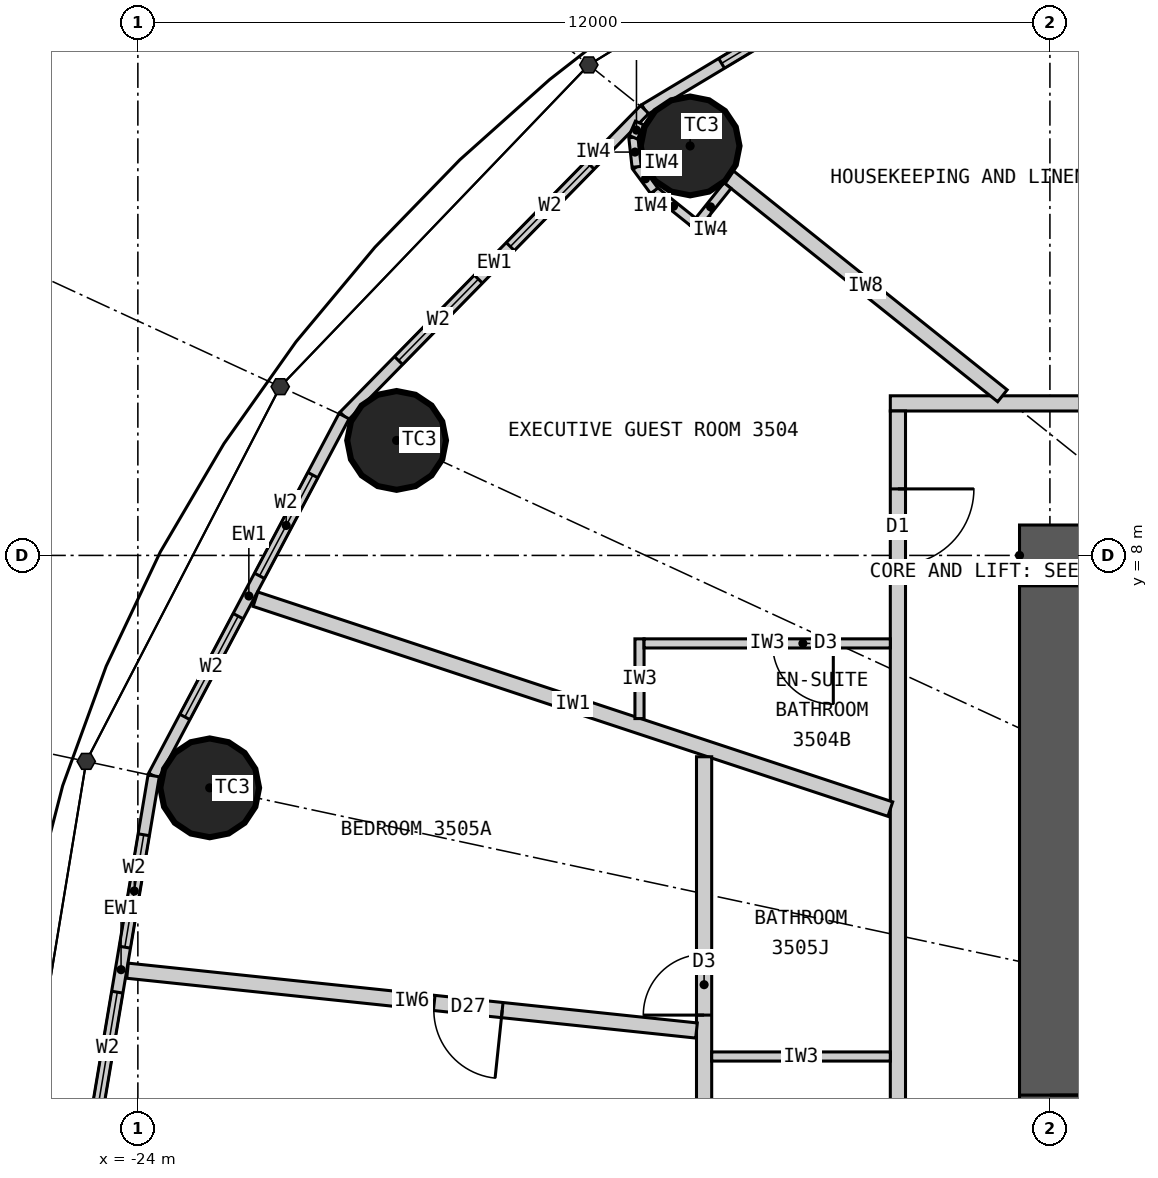
"""IFC4 building model, lengths in metres.
Left out: names, types, materials, properties, quantities, classifications, styles, units other than length and angle.
Written with IfcOpenShell. Run it as: python <this file> out.ifc"""

import sys

from ifc_helpers import new_model, si_unit, direction, frame, frame_2d, origin, origin_2d, place, context, subcontext, project, spatial, rectangle, circle, extrude, clip, halfspace, element, fill, save


model = new_model("IFC4")
c1 = context("Model", 3, precision=1e-05, world=origin(), true_north=direction((0.0, 1.0)))
c2 = subcontext(c1, "Body", "Model", "MODEL_VIEW")
j1 = project(units=[si_unit("LENGTHUNIT", "METRE"), si_unit("PLANEANGLEUNIT", "RADIAN")], contexts=[c1])
p1 = place(None, origin())
s1 = spatial("IfcSite", under=j1, at=p1, CompositionType="ELEMENT")
p2 = place(p1, origin())
s2 = spatial("IfcBuilding", under=s1, at=p2, CompositionType="ELEMENT")
p3 = place(p2, frame((0.0, 0.0, 135.3)))
s3 = spatial("IfcBuildingStorey", under=s2, at=p3, CompositionType="ELEMENT", Elevation=135.3)
for number, where, z_axis, x_axis in (
    (1, (-16.734, 13.387, 0.0), (0.0, 0.0, 1.0), (1.0, 0.0, 0.0)),
    (2, (-20.596, 9.513, 0.0), (0.0, 0.0, 1.0), (1.0, 0.0, 0.0)),
    (3, (-23.055, 4.942, 0.0), (0.0, 0.0, 1.0), (1.0, 0.0, 0.0)),
):
    element("IfcColumn", number, at=place(p3, frame(where, z_axis=z_axis, x_axis=x_axis)), inside=s3, PredefinedType="COLUMN", context=c2, shape_type="Clipping", body=[
        clip(extrude(circle(Radius=0.65, at=origin_2d()), origin(), (0.0, 0.0, 1.0), 3.3), halfspace(frame((0.0, 0.0, 2.25), z_axis=(0.0, 0.0, 1.0), x_axis=(1.0, 0.0, 0.0)), False)),
    ])
p4 = place(p3, frame((-12.4, 8.0, 0.0), z_axis=(0.0, 0.0, 1.0), x_axis=(1.0, 0.0, 0.0)))
e4 = element("IfcWall", 4, at=p4, inside=s3, PredefinedType="SHEAR", context=c2, shape_type="SweptSolid", body=[
    extrude(rectangle(XDim=24.8, YDim=0.8, at=frame_2d((12.4, 0.0))), origin(), (0.0, 0.0, 1.0), 3.3),
])
p5 = place(p4, frame((11.1, 0.0, 0.0)))
e5 = element("IfcOpeningElement", 5, at=p5, cuts=e4, PredefinedType="OPENING", context=c2, shape_type="SweptSolid", body=[
    extrude(rectangle(XDim=1.2, YDim=2.2, at=frame_2d((0.6, 1.1))), frame((0.0, 0.41, 0.0), z_axis=(0.0, -1.0, 0.0), x_axis=(1.0, 0.0, 0.0)), (0.0, 0.0, 1.0), 0.82),
])
p6 = place(p4, frame((18.7, 0.0, 0.0)))
e6 = element("IfcOpeningElement", 6, at=p6, cuts=e4, PredefinedType="OPENING", context=c2, shape_type="SweptSolid", body=[
    extrude(rectangle(XDim=0.9, YDim=2.2, at=frame_2d((0.45, 1.1))), frame((0.0, 0.41, 0.0), z_axis=(0.0, -1.0, 0.0), x_axis=(1.0, 0.0, 0.0)), (0.0, 0.0, 1.0), 0.82),
])
p7 = place(p3, frame((-12.0, 7.6, 0.0), z_axis=(0.0, 0.0, 1.0), x_axis=(0.0, -1.0, 0.0)))
e7 = element("IfcWall", 7, at=p7, inside=s3, PredefinedType="SHEAR", context=c2, shape_type="SweptSolid", body=[
    extrude(rectangle(XDim=15.2, YDim=0.8, at=frame_2d((7.6, 0.0))), origin(), (0.0, 0.0, 1.0), 3.3),
])
p8 = place(p7, frame((6.7, 0.0, 0.0)))
e8 = element("IfcOpeningElement", 8, at=p8, cuts=e7, PredefinedType="OPENING", context=c2, shape_type="SweptSolid", body=[
    extrude(rectangle(XDim=1.8, YDim=2.2, at=frame_2d((0.9, 1.1))), frame((0.0, 0.41, 0.0), z_axis=(0.0, -1.0, 0.0), x_axis=(1.0, 0.0, 0.0)), (0.0, 0.0, 1.0), 0.82),
])
p9 = place(p3, frame((-12.221, 16.935, 0.0), z_axis=(0.0, 0.0, 1.0), x_axis=(-0.857308573723, -0.514802884044, 0.0)))
e9 = element("IfcWall", 9, at=p9, inside=s3, PredefinedType="ELEMENTEDWALL", context=c2, shape_type="SweptSolid", body=[
    extrude(rectangle(XDim=5.961, YDim=0.15, at=frame_2d((2.98, 0.0))), origin(), (0.0, 0.0, 1.0), 3.05),
])
p10 = place(p9, frame((1.181, 0.0, 0.9)))
e10 = element("IfcOpeningElement", 10, at=p10, cuts=e9, PredefinedType="OPENING", context=c2, shape_type="SweptSolid", body=[
    extrude(rectangle(XDim=1.5, YDim=1.9, at=frame_2d((0.75, 0.95))), frame((0.0, 0.085, 0.0), z_axis=(0.0, -1.0, 0.0), x_axis=(1.0, 0.0, 0.0)), (0.0, 0.0, 1.0), 0.17),
])
p11 = place(p9, frame((3.281, 0.0, 0.9)))
e11 = element("IfcOpeningElement", 11, at=p11, cuts=e9, PredefinedType="OPENING", context=c2, shape_type="SweptSolid", body=[
    extrude(rectangle(XDim=1.5, YDim=1.9, at=frame_2d((0.75, 0.95))), frame((0.0, 0.085, 0.0), z_axis=(0.0, -1.0, 0.0), x_axis=(1.0, 0.0, 0.0)), (0.0, 0.0, 1.0), 0.17),
])
p12 = place(p3, frame((-17.332, 13.866, 0.0), z_axis=(0.0, 0.0, 1.0), x_axis=(-0.700136650834, -0.714008872605, 0.0)))
e12 = element("IfcWall", 12, at=p12, inside=s3, PredefinedType="ELEMENTEDWALL", context=c2, shape_type="SweptSolid", body=[
    extrude(rectangle(XDim=5.649, YDim=0.15, at=frame_2d((2.825, 0.0))), origin(), (0.0, 0.0, 1.0), 3.05),
])
p13 = place(p12, frame((1.025, 0.0, 0.9)))
e13 = element("IfcOpeningElement", 13, at=p13, cuts=e12, PredefinedType="OPENING", context=c2, shape_type="SweptSolid", body=[
    extrude(rectangle(XDim=1.5, YDim=1.9, at=frame_2d((0.75, 0.95))), frame((0.0, 0.085, 0.0), z_axis=(0.0, -1.0, 0.0), x_axis=(1.0, 0.0, 0.0)), (0.0, 0.0, 1.0), 0.17),
])
p14 = place(p12, frame((3.125, 0.0, 0.9)))
e14 = element("IfcOpeningElement", 14, at=p14, cuts=e12, PredefinedType="OPENING", context=c2, shape_type="SweptSolid", body=[
    extrude(rectangle(XDim=1.5, YDim=1.9, at=frame_2d((0.75, 0.95))), frame((0.0, 0.085, 0.0), z_axis=(0.0, -1.0, 0.0), x_axis=(1.0, 0.0, 0.0)), (0.0, 0.0, 1.0), 0.17),
])
p15 = place(p3, frame((-21.287, 9.832, 0.0), z_axis=(0.0, 0.0, 1.0), x_axis=(-0.467814388454, -0.883826735257, 0.0)))
e15 = element("IfcWall", 15, at=p15, inside=s3, PredefinedType="ELEMENTEDWALL", context=c2, shape_type="SweptSolid", body=[
    extrude(rectangle(XDim=5.354, YDim=0.15, at=frame_2d((2.677, 0.0))), origin(), (0.0, 0.0, 1.0), 3.05),
])
p16 = place(p15, frame((0.877, 0.0, 0.9)))
e16 = element("IfcOpeningElement", 16, at=p16, cuts=e15, PredefinedType="OPENING", context=c2, shape_type="SweptSolid", body=[
    extrude(rectangle(XDim=1.5, YDim=1.9, at=frame_2d((0.75, 0.95))), frame((0.0, 0.085, 0.0), z_axis=(0.0, -1.0, 0.0), x_axis=(1.0, 0.0, 0.0)), (0.0, 0.0, 1.0), 0.17),
])
p17 = place(p15, frame((2.977, 0.0, 0.9)))
e17 = element("IfcOpeningElement", 17, at=p17, cuts=e15, PredefinedType="OPENING", context=c2, shape_type="SweptSolid", body=[
    extrude(rectangle(XDim=1.5, YDim=1.9, at=frame_2d((0.75, 0.95))), frame((0.0, 0.085, 0.0), z_axis=(0.0, -1.0, 0.0), x_axis=(1.0, 0.0, 0.0)), (0.0, 0.0, 1.0), 0.17),
])
p18 = place(p3, frame((-23.792, 5.1, 0.0), z_axis=(0.0, 0.0, 1.0), x_axis=(-0.165883894218, -0.986145290329, 0.0)))
e18 = element("IfcWall", 18, at=p18, inside=s3, PredefinedType="ELEMENTEDWALL", context=c2, shape_type="SweptSolid", body=[
    extrude(rectangle(XDim=5.172, YDim=0.15, at=frame_2d((2.586, 0.0))), origin(), (0.0, 0.0, 1.0), 3.05),
])
p19 = place(p18, frame((0.786, 0.0, 0.9)))
e19 = element("IfcOpeningElement", 19, at=p19, cuts=e18, PredefinedType="OPENING", context=c2, shape_type="SweptSolid", body=[
    extrude(rectangle(XDim=1.5, YDim=1.9, at=frame_2d((0.75, 0.95))), frame((0.0, 0.085, 0.0), z_axis=(0.0, -1.0, 0.0), x_axis=(1.0, 0.0, 0.0)), (0.0, 0.0, 1.0), 0.17),
])
p20 = place(p18, frame((2.886, 0.0, 0.9)))
e20 = element("IfcOpeningElement", 20, at=p20, cuts=e18, PredefinedType="OPENING", context=c2, shape_type="SweptSolid", body=[
    extrude(rectangle(XDim=1.5, YDim=1.9, at=frame_2d((0.75, 0.95))), frame((0.0, 0.085, 0.0), z_axis=(0.0, -1.0, 0.0), x_axis=(1.0, 0.0, 0.0)), (0.0, 0.0, 1.0), 0.17),
])
p21 = place(p3, frame((-14.1, 10.0, 0.0), z_axis=(0.0, 0.0, 1.0), x_axis=(1.0, 0.0, 0.0)))
e21 = element("IfcWall", 21, at=p21, inside=s3, PredefinedType="PARTITIONING", context=c2, shape_type="SweptSolid", body=[
    extrude(rectangle(XDim=28.2, YDim=0.2, at=frame_2d((14.1, 0.0))), origin(), (0.0, 0.0, 1.0), 3.05),
])
p22 = place(p21, frame((12.884, 0.0, 0.0)))
e22 = element("IfcOpeningElement", 22, at=p22, cuts=e21, PredefinedType="OPENING", context=c2, shape_type="SweptSolid", body=[
    extrude(rectangle(XDim=1.0, YDim=2.2, at=frame_2d((0.5, 1.1))), frame((0.0, 0.11, 0.0), z_axis=(0.0, -1.0, 0.0), x_axis=(1.0, 0.0, 0.0)), (0.0, 0.0, 1.0), 0.22),
])
p23 = place(p21, frame((8.164, 0.0, 0.0)))
e23 = element("IfcOpeningElement", 23, at=p23, cuts=e21, PredefinedType="OPENING", context=c2, shape_type="SweptSolid", body=[
    extrude(rectangle(XDim=1.0, YDim=2.1, at=frame_2d((0.5, 1.05))), frame((0.0, 0.11, 0.0), z_axis=(0.0, -1.0, 0.0), x_axis=(1.0, 0.0, 0.0)), (0.0, 0.0, 1.0), 0.22),
])
p24 = place(p21, frame((3.591, 0.0, 0.0)))
e24 = element("IfcOpeningElement", 24, at=p24, cuts=e21, PredefinedType="OPENING", context=c2, shape_type="SweptSolid", body=[
    extrude(rectangle(XDim=1.0, YDim=2.2, at=frame_2d((0.5, 1.1))), frame((0.0, 0.11, 0.0), z_axis=(0.0, -1.0, 0.0), x_axis=(1.0, 0.0, 0.0)), (0.0, 0.0, 1.0), 0.22),
])
p25 = place(p21, frame((17.12, 0.0, 0.0)))
e25 = element("IfcOpeningElement", 25, at=p25, cuts=e21, PredefinedType="OPENING", context=c2, shape_type="SweptSolid", body=[
    extrude(rectangle(XDim=1.0, YDim=2.1, at=frame_2d((0.5, 1.05))), frame((0.0, 0.11, 0.0), z_axis=(0.0, -1.0, 0.0), x_axis=(1.0, 0.0, 0.0)), (0.0, 0.0, 1.0), 0.22),
])
p26 = place(p3, frame((-14.0, 9.9, 0.0), z_axis=(0.0, 0.0, 1.0), x_axis=(0.0, -1.0, 0.0)))
e26 = element("IfcWall", 26, at=p26, inside=s3, PredefinedType="PARTITIONING", context=c2, shape_type="SweptSolid", body=[
    extrude(rectangle(XDim=19.8, YDim=0.2, at=frame_2d((9.9, 0.0))), origin(), (0.0, 0.0, 1.0), 3.05),
])
p27 = place(p26, frame((1.025, 0.0, 0.0)))
e27 = element("IfcOpeningElement", 27, at=p27, cuts=e26, PredefinedType="OPENING", context=c2, shape_type="SweptSolid", body=[
    extrude(rectangle(XDim=1.0, YDim=2.2, at=frame_2d((0.5, 1.1))), frame((0.0, 0.11, 0.0), z_axis=(0.0, -1.0, 0.0), x_axis=(1.0, 0.0, 0.0)), (0.0, 0.0, 1.0), 0.22),
])
p28 = place(p26, frame((10.831, 0.0, 0.0)))
e28 = element("IfcOpeningElement", 28, at=p28, cuts=e26, PredefinedType="OPENING", context=c2, shape_type="SweptSolid", body=[
    extrude(rectangle(XDim=1.0, YDim=2.2, at=frame_2d((0.5, 1.1))), frame((0.0, 0.11, 0.0), z_axis=(0.0, -1.0, 0.0), x_axis=(1.0, 0.0, 0.0)), (0.0, 0.0, 1.0), 0.22),
])
p29 = place(p3, frame((-12.625, 10.1, 0.0), z_axis=(0.0, 0.0, 1.0), x_axis=(-0.780863644897, 0.624701503182, 0.0)))
e29 = element("IfcWall", 29, at=p29, inside=s3, PredefinedType="PARTITIONING", context=c2, shape_type="SweptSolid", body=[
    extrude(rectangle(XDim=4.612, YDim=0.2, at=frame_2d((2.306, 0.0))), origin(), (0.0, 0.0, 1.0), 2.15),
])
p30 = place(p3, frame((-14.1, 4.662, 0.0), z_axis=(0.0, 0.0, 1.0), x_axis=(-0.949446466373, 0.313928984789, 0.0)))
e30 = element("IfcWall", 30, at=p30, inside=s3, PredefinedType="PARTITIONING", context=c2, shape_type="SweptSolid", body=[
    extrude(rectangle(XDim=8.797, YDim=0.2, at=frame_2d((4.399, 0.0))), origin(), (0.0, 0.0, 1.0), 3.05),
])
p31 = place(p3, frame((-17.4, 5.854, 0.0), z_axis=(0.0, 0.0, 1.0), x_axis=(0.0, 1.0, 0.0)))
e31 = element("IfcWall", 31, at=p31, inside=s3, PredefinedType="PARTITIONING", context=c2, shape_type="SweptSolid", body=[
    extrude(rectangle(XDim=1.049, YDim=0.12, at=frame_2d((0.524, 0.0))), origin(), (0.0, 0.0, 1.0), 3.05),
])
p32 = place(p3, frame((-14.1, 6.842, 0.0), z_axis=(0.0, 0.0, 1.0), x_axis=(-1.0, 0.0, 0.0)))
e32 = element("IfcWall", 32, at=p32, inside=s3, PredefinedType="PARTITIONING", context=c2, shape_type="SweptSolid", body=[
    extrude(rectangle(XDim=3.24, YDim=0.12, at=frame_2d((1.62, 0.0))), origin(), (0.0, 0.0, 1.0), 3.05),
])
p33 = place(p32, frame((0.75, 0.0, 0.0)))
e33 = element("IfcOpeningElement", 33, at=p33, cuts=e32, PredefinedType="OPENING", context=c2, shape_type="SweptSolid", body=[
    extrude(rectangle(XDim=0.8, YDim=2.1, at=frame_2d((0.4, 1.05))), frame((0.0, 0.07, 0.0), z_axis=(0.0, -1.0, 0.0), x_axis=(1.0, 0.0, 0.0)), (0.0, 0.0, 1.0), 0.14),
])
p34 = place(p3, frame((-16.55, 5.351, 0.0), z_axis=(0.0, 0.0, 1.0), x_axis=(0.0, -1.0, 0.0)))
e34 = element("IfcWall", 34, at=p34, inside=s3, PredefinedType="PARTITIONING", context=c2, shape_type="SweptSolid", body=[
    extrude(rectangle(XDim=14.96, YDim=0.2, at=frame_2d((7.48, 0.0))), origin(), (0.0, 0.0, 1.0), 3.05),
])
p35 = place(p34, frame((2.599, 0.0, 0.0)))
e35 = element("IfcOpeningElement", 35, at=p35, cuts=e34, PredefinedType="OPENING", context=c2, shape_type="SweptSolid", body=[
    extrude(rectangle(XDim=0.8, YDim=2.1, at=frame_2d((0.4, 1.05))), frame((0.0, 0.11, 0.0), z_axis=(0.0, -1.0, 0.0), x_axis=(1.0, 0.0, 0.0)), (0.0, 0.0, 1.0), 0.22),
])
p36 = place(p34, frame((11.27, 0.0, 0.0)))
e36 = element("IfcOpeningElement", 36, at=p36, cuts=e34, PredefinedType="OPENING", context=c2, shape_type="SweptSolid", body=[
    extrude(rectangle(XDim=0.8, YDim=2.1, at=frame_2d((0.4, 1.05))), frame((0.0, 0.11, 0.0), z_axis=(0.0, -1.0, 0.0), x_axis=(1.0, 0.0, 0.0)), (0.0, 0.0, 1.0), 0.22),
])
p37 = place(p34, frame((6.782, 0.0, 0.0)))
e37 = element("IfcOpeningElement", 37, at=p37, cuts=e34, PredefinedType="OPENING", context=c2, shape_type="SweptSolid", body=[
    extrude(rectangle(XDim=0.9, YDim=2.1, at=frame_2d((0.45, 1.05))), frame((0.0, 0.11, 0.0), z_axis=(0.0, -1.0, 0.0), x_axis=(1.0, 0.0, 0.0)), (0.0, 0.0, 1.0), 0.22),
])
p38 = place(p3, frame((-16.65, 1.75, 0.0), z_axis=(0.0, 0.0, 1.0), x_axis=(-0.994524630042, 0.104502441313, 0.0)))
e38 = element("IfcWall", 38, at=p38, inside=s3, PredefinedType="PARTITIONING", context=c2, shape_type="SweptSolid", body=[
    extrude(rectangle(XDim=7.527, YDim=0.2, at=frame_2d((3.764, 0.0))), origin(), (0.0, 0.0, 1.0), 3.05),
])
p39 = place(p38, frame((2.57, 0.0, 0.0)))
e39 = element("IfcOpeningElement", 39, at=p39, cuts=e38, PredefinedType="OPENING", context=c2, shape_type="SweptSolid", body=[
    extrude(rectangle(XDim=0.9, YDim=2.1, at=frame_2d((0.45, 1.05))), frame((0.0, 0.11, 0.0), z_axis=(0.0, -1.0, 0.0), x_axis=(1.0, 0.0, 0.0)), (0.0, 0.0, 1.0), 0.22),
])
p40 = place(p3, frame((-14.1, 1.408, 0.0), z_axis=(0.0, 0.0, 1.0), x_axis=(-1.0, 0.0, 0.0)))
e40 = element("IfcWall", 40, at=p40, inside=s3, PredefinedType="PARTITIONING", context=c2, shape_type="SweptSolid", body=[
    extrude(rectangle(XDim=2.35, YDim=0.12, at=frame_2d((1.175, 0.0))), origin(), (0.0, 0.0, 1.0), 2.3),
])
p41 = place(p3, frame((-16.242, 12.865, 0.0), z_axis=(0.0, 0.0, 1.0), x_axis=(-0.624861414622, -0.780735686719, 0.0)))
e41 = element("IfcWall", 41, at=p41, inside=s3, PredefinedType="PARTITIONING", context=c2, shape_type="SweptSolid", body=[
    extrude(rectangle(XDim=0.716, YDim=0.12, at=frame_2d((0.358, 0.0))), origin(), (0.0, 0.0, 1.0), 3.05),
])
p42 = place(p3, frame((-16.698, 12.391, 0.0), z_axis=(0.0, 0.0, 1.0), x_axis=(-0.780722240533, 0.624878214645, 0.0)))
e42 = element("IfcWall", 42, at=p42, inside=s3, PredefinedType="PARTITIONING", context=c2, shape_type="SweptSolid", body=[
    extrude(rectangle(XDim=0.65, YDim=0.12, at=frame_2d((0.325, 0.0))), origin(), (0.0, 0.0, 1.0), 3.05),
])
p43 = place(p3, frame((-17.206, 12.797, 0.0), z_axis=(0.0, 0.0, 1.0), x_axis=(-0.592986095904, 0.805212698648, 0.0)))
e43 = element("IfcWall", 43, at=p43, inside=s3, PredefinedType="PARTITIONING", context=c2, shape_type="SweptSolid", body=[
    extrude(rectangle(XDim=0.391, YDim=0.12, at=frame_2d((0.196, 0.0))), origin(), (0.0, 0.0, 1.0), 3.05),
])
p44 = place(p3, frame((-17.438, 13.112, 0.0), z_axis=(0.0, 0.0, 1.0), x_axis=(-0.109815164188, 0.993952025862, 0.0)))
e44 = element("IfcWall", 44, at=p44, inside=s3, PredefinedType="PARTITIONING", context=c2, shape_type="SweptSolid", body=[
    extrude(rectangle(XDim=0.391, YDim=0.12, at=frame_2d((0.196, 0.0))), origin(), (0.0, 0.0, 1.0), 3.05),
])
p45 = place(p3, frame((-17.481, 13.501, 0.0), z_axis=(0.0, 0.0, 1.0), x_axis=(0.401504188288, 0.915857186895, 0.0)))
e45 = element("IfcWall", 45, at=p45, inside=s3, PredefinedType="PARTITIONING", context=c2, shape_type="SweptSolid", body=[
    extrude(rectangle(XDim=0.206, YDim=0.12, at=frame_2d((0.103, 0.0))), origin(), (0.0, 0.0, 1.0), 3.05),
])
p46 = place(p11, origin())
e46 = element("IfcWindow", 46, at=p46, inside=s3, PartitioningType="SINGLE_PANEL", PredefinedType="WINDOW", context=c2, shape_type="SweptSolid", body=[
    extrude(rectangle(XDim=1.5, YDim=1.9, at=frame_2d((0.75, 0.95))), frame((0.0, 0.03, 0.0), z_axis=(0.0, -1.0, 0.0), x_axis=(1.0, 0.0, 0.0)), (0.0, 0.0, 1.0), 0.06),
])
fill(e11, e46)
p47 = place(p13, origin())
e47 = element("IfcWindow", 47, at=p47, inside=s3, PartitioningType="SINGLE_PANEL", PredefinedType="WINDOW", context=c2, shape_type="SweptSolid", body=[
    extrude(rectangle(XDim=1.5, YDim=1.9, at=frame_2d((0.75, 0.95))), frame((0.0, 0.03, 0.0), z_axis=(0.0, -1.0, 0.0), x_axis=(1.0, 0.0, 0.0)), (0.0, 0.0, 1.0), 0.06),
])
fill(e13, e47)
p48 = place(p14, origin())
e48 = element("IfcWindow", 48, at=p48, inside=s3, PartitioningType="SINGLE_PANEL", PredefinedType="WINDOW", context=c2, shape_type="SweptSolid", body=[
    extrude(rectangle(XDim=1.5, YDim=1.9, at=frame_2d((0.75, 0.95))), frame((0.0, 0.03, 0.0), z_axis=(0.0, -1.0, 0.0), x_axis=(1.0, 0.0, 0.0)), (0.0, 0.0, 1.0), 0.06),
])
fill(e14, e48)
p49 = place(p16, origin())
e49 = element("IfcWindow", 49, at=p49, inside=s3, PartitioningType="SINGLE_PANEL", PredefinedType="WINDOW", context=c2, shape_type="SweptSolid", body=[
    extrude(rectangle(XDim=1.5, YDim=1.9, at=frame_2d((0.75, 0.95))), frame((0.0, 0.03, 0.0), z_axis=(0.0, -1.0, 0.0), x_axis=(1.0, 0.0, 0.0)), (0.0, 0.0, 1.0), 0.06),
])
fill(e16, e49)
p50 = place(p17, origin())
e50 = element("IfcWindow", 50, at=p50, inside=s3, PartitioningType="SINGLE_PANEL", PredefinedType="WINDOW", context=c2, shape_type="SweptSolid", body=[
    extrude(rectangle(XDim=1.5, YDim=1.9, at=frame_2d((0.75, 0.95))), frame((0.0, 0.03, 0.0), z_axis=(0.0, -1.0, 0.0), x_axis=(1.0, 0.0, 0.0)), (0.0, 0.0, 1.0), 0.06),
])
fill(e17, e50)
p51 = place(p19, origin())
e51 = element("IfcWindow", 51, at=p51, inside=s3, PartitioningType="SINGLE_PANEL", PredefinedType="WINDOW", context=c2, shape_type="SweptSolid", body=[
    extrude(rectangle(XDim=1.5, YDim=1.9, at=frame_2d((0.75, 0.95))), frame((0.0, 0.03, 0.0), z_axis=(0.0, -1.0, 0.0), x_axis=(1.0, 0.0, 0.0)), (0.0, 0.0, 1.0), 0.06),
])
fill(e19, e51)
p52 = place(p20, origin())
e52 = element("IfcWindow", 52, at=p52, inside=s3, PartitioningType="SINGLE_PANEL", PredefinedType="WINDOW", context=c2, shape_type="SweptSolid", body=[
    extrude(rectangle(XDim=1.5, YDim=1.9, at=frame_2d((0.75, 0.95))), frame((0.0, 0.03, 0.0), z_axis=(0.0, -1.0, 0.0), x_axis=(1.0, 0.0, 0.0)), (0.0, 0.0, 1.0), 0.06),
])
fill(e20, e52)
p53 = place(p33, origin())
e53 = element("IfcDoor", 53, at=p53, inside=s3, OperationType="SINGLE_SWING_LEFT", PredefinedType="DOOR", context=c2, shape_type="SweptSolid", body=[
    extrude(rectangle(XDim=0.8, YDim=2.1, at=frame_2d((0.4, 1.05))), frame((0.0, 0.025, 0.0), z_axis=(0.0, -1.0, 0.0), x_axis=(1.0, 0.0, 0.0)), (0.0, 0.0, 1.0), 0.05),
])
fill(e33, e53)
p54 = place(p27, origin())
e54 = element("IfcDoor", 54, at=p54, inside=s3, OperationType="SINGLE_SWING_LEFT", PredefinedType="DOOR", context=c2, shape_type="SweptSolid", body=[
    extrude(rectangle(XDim=1.0, YDim=2.2, at=frame_2d((0.5, 1.1))), frame((0.0, 0.025, 0.0), z_axis=(0.0, -1.0, 0.0), x_axis=(1.0, 0.0, 0.0)), (0.0, 0.0, 1.0), 0.05),
])
fill(e27, e54)
p55 = place(p35, origin())
e55 = element("IfcDoor", 55, at=p55, inside=s3, OperationType="SINGLE_SWING_RIGHT", PredefinedType="DOOR", context=c2, shape_type="SweptSolid", body=[
    extrude(rectangle(XDim=0.8, YDim=2.1, at=frame_2d((0.4, 1.05))), frame((0.0, 0.025, 0.0), z_axis=(0.0, -1.0, 0.0), x_axis=(1.0, 0.0, 0.0)), (0.0, 0.0, 1.0), 0.05),
])
fill(e35, e55)
p56 = place(p39, origin())
e56 = element("IfcDoor", 56, at=p56, inside=s3, OperationType="SINGLE_SWING_LEFT", PredefinedType="DOOR", context=c2, shape_type="SweptSolid", body=[
    extrude(rectangle(XDim=0.9, YDim=2.1, at=frame_2d((0.45, 1.05))), frame((0.0, 0.025, 0.0), z_axis=(0.0, -1.0, 0.0), x_axis=(1.0, 0.0, 0.0)), (0.0, 0.0, 1.0), 0.05),
])
fill(e39, e56)
p57 = place(p8, origin())
e57 = element("IfcDoor", 57, at=p57, inside=s3, OperationType="DOUBLE_DOOR_DOUBLE_SWING", PredefinedType="DOOR", context=c2, shape_type="SweptSolid", body=[
    extrude(rectangle(XDim=1.8, YDim=2.2, at=frame_2d((0.9, 1.1))), frame((0.0, 0.025, 0.0), z_axis=(0.0, -1.0, 0.0), x_axis=(1.0, 0.0, 0.0)), (0.0, 0.0, 1.0), 0.05),
])
fill(e8, e57)
save(model, sys.argv[1])
